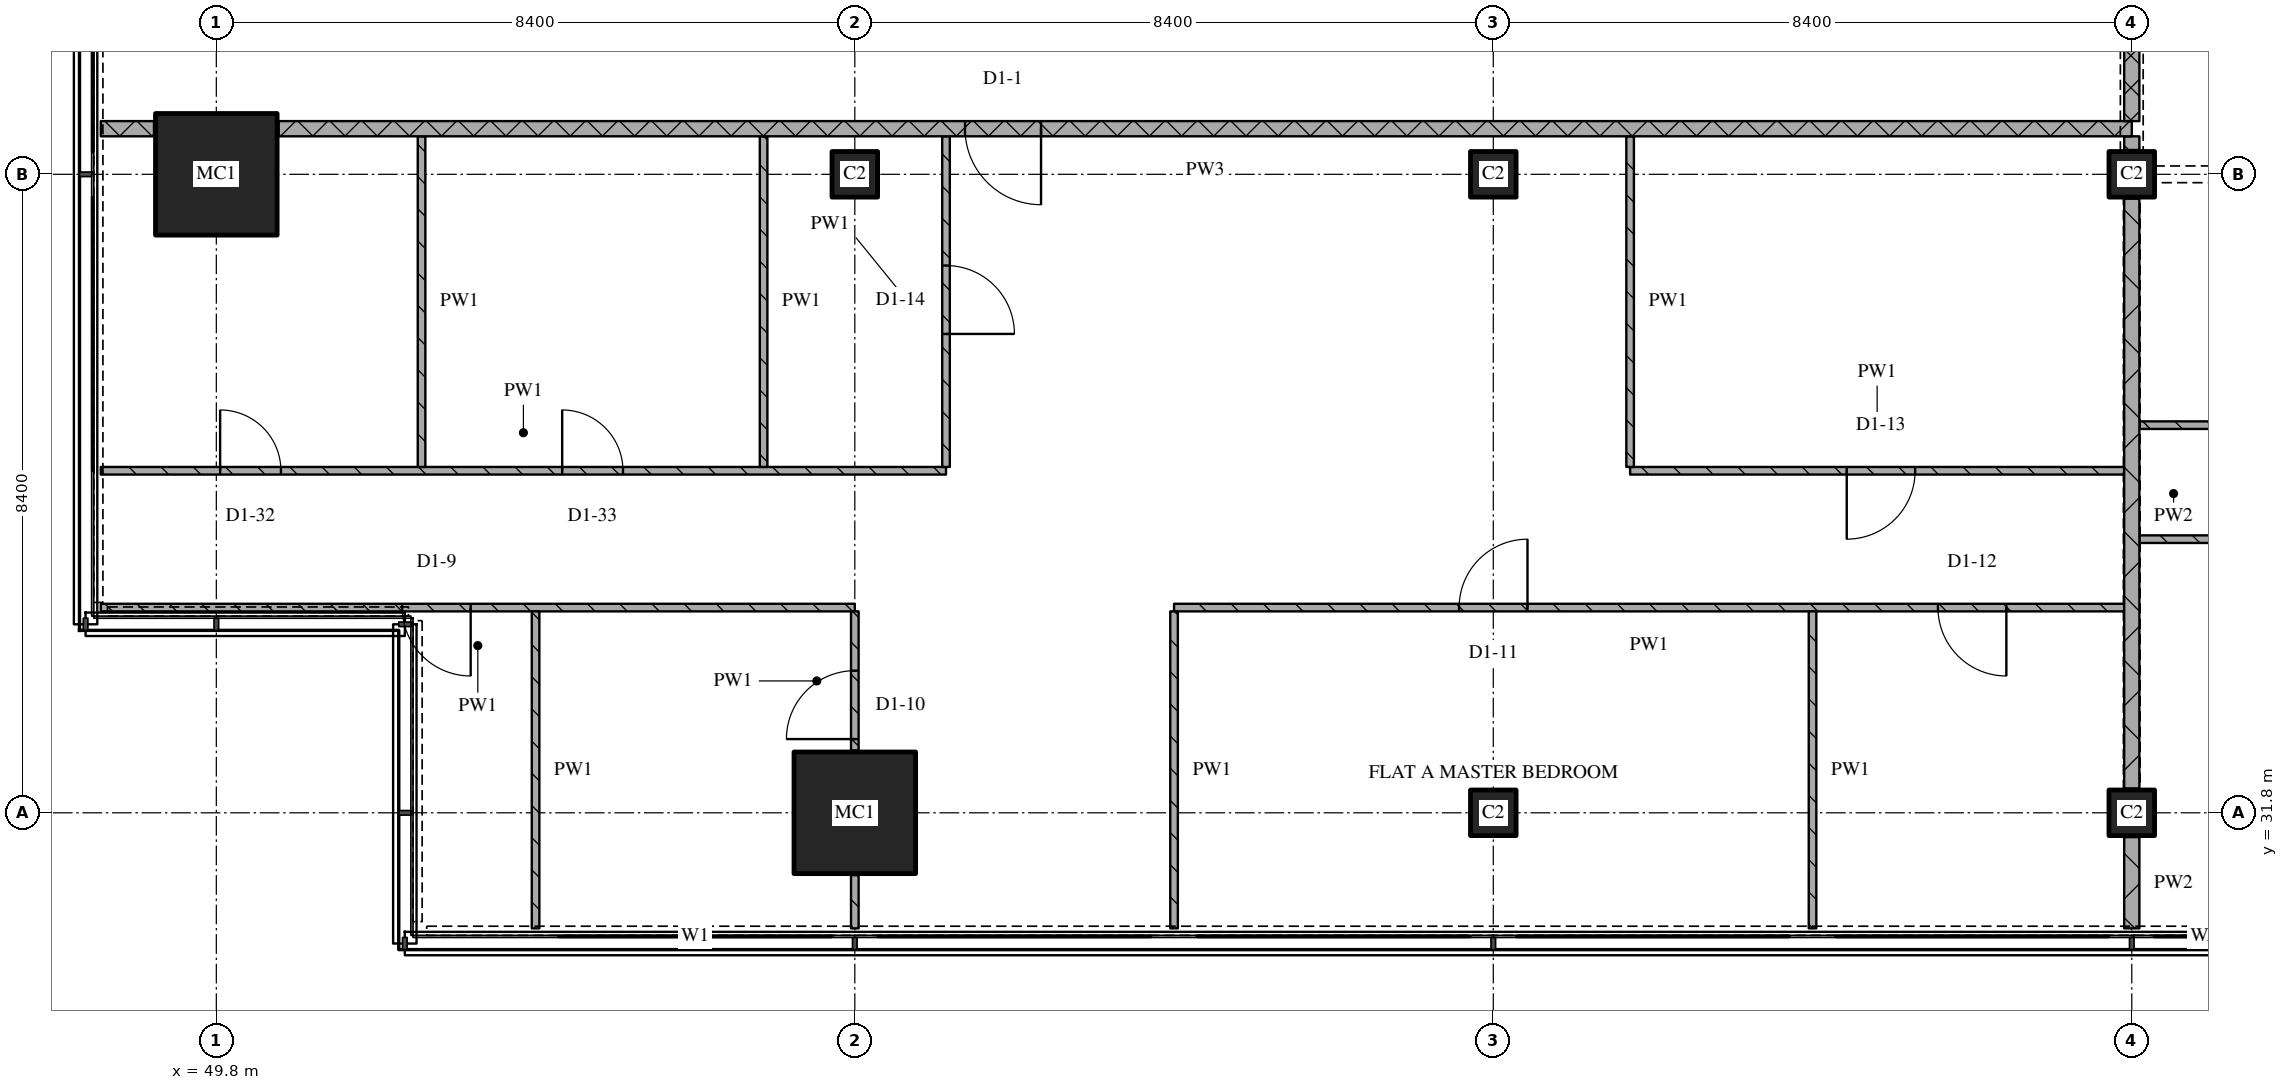
"""IFC4 building model, lengths in metres.
Left out: names, types, materials, properties, quantities, classifications, styles, units other than length and angle.
Written with IfcOpenShell. Run it as: python <this file> out.ifc"""

import sys

from ifc_helpers import new_model, si_unit, direction, frame, frame_2d, origin, origin_2d, place, context, subcontext, project, spatial, rectangle, extrude, element, fill, save


model = new_model("IFC4")
c1 = context("Model", 3, precision=1e-05, world=origin(), true_north=direction((0.0, 1.0)))
c2 = subcontext(c1, "Body", "Model", "MODEL_VIEW")
j1 = project(units=[si_unit("LENGTHUNIT", "METRE"), si_unit("PLANEANGLEUNIT", "RADIAN")], contexts=[c1])
p1 = place(None, origin())
s1 = spatial("IfcSite", under=j1, at=p1, CompositionType="ELEMENT")
p2 = place(p1, origin())
s2 = spatial("IfcBuilding", under=s1, at=p2, CompositionType="ELEMENT")
p3 = place(p2, frame((0.0, 0.0, 205.5)))
s3 = spatial("IfcBuildingStorey", under=s2, at=p3, CompositionType="ELEMENT", Elevation=205.5)
for number, where, z_axis, x_axis in (
    (1, (49.8, 40.2, 0.0), (0.0, 0.0, 1.0), (1.0, 0.0, 0.0)),
    (2, (58.2, 31.8, 0.0), (0.0, 0.0, 1.0), (1.0, 0.0, 0.0)),
):
    element("IfcColumn", number, at=place(p3, frame(where, z_axis=z_axis, x_axis=x_axis)), inside=s3, PredefinedType="COLUMN", context=c2, shape_type="SweptSolid", body=[
        extrude(rectangle(XDim=1.6, YDim=1.6, at=origin_2d()), origin(), (0.0, 0.0, 1.0), 3.6),
    ])
for number, where, z_axis, x_axis in (
    (3, (58.2, 40.2, 0.0), (0.0, 0.0, 1.0), (1.0, 0.0, 0.0)),
    (4, (66.6, 31.8, 0.0), (0.0, 0.0, 1.0), (1.0, 0.0, 0.0)),
    (5, (66.6, 40.2, 0.0), (0.0, 0.0, 1.0), (1.0, 0.0, 0.0)),
    (6, (75.0, 31.8, 0.0), (0.0, 0.0, 1.0), (1.0, 0.0, 0.0)),
    (7, (75.0, 40.2, 0.0), (0.0, 0.0, 1.0), (1.0, 0.0, 0.0)),
):
    element("IfcColumn", number, at=place(p3, frame(where, z_axis=z_axis, x_axis=x_axis)), inside=s3, PredefinedType="COLUMN", context=c2, shape_type="SweptSolid", body=[
        extrude(rectangle(XDim=0.6, YDim=0.6, at=origin_2d()), origin(), (0.0, 0.0, 1.0), 3.6),
    ])
p4 = place(p3, frame((58.2, 34.5, 0.0), z_axis=(0.0, 0.0, 1.0), x_axis=(-1.0, 0.0, 0.0)))
e8 = element("IfcWall", 8, at=p4, inside=s3, PredefinedType="PARTITIONING", context=c2, shape_type="SweptSolid", body=[
    extrude(rectangle(XDim=9.92, YDim=0.1, at=frame_2d((4.96, 0.0))), origin(), (0.0, 0.0, 1.0), 3.32),
])
p5 = place(p4, frame((5.054, 0.0, 0.0)))
e9 = element("IfcOpeningElement", 9, at=p5, cuts=e8, PredefinedType="OPENING", context=c2, shape_type="SweptSolid", body=[
    extrude(rectangle(XDim=0.9, YDim=2.1, at=frame_2d((0.45, 1.05))), frame((0.0, 0.06, 0.0), z_axis=(0.0, -1.0, 0.0), x_axis=(1.0, 0.0, 0.0)), (0.0, 0.0, 1.0), 0.12),
])
p6 = place(p3, frame((74.9, 34.5, 0.0), z_axis=(0.0, 0.0, 1.0), x_axis=(-1.0, 0.0, 0.0)))
e10 = element("IfcWall", 10, at=p6, inside=s3, PredefinedType="PARTITIONING", context=c2, shape_type="SweptSolid", body=[
    extrude(rectangle(XDim=12.5, YDim=0.1, at=frame_2d((6.25, 0.0))), origin(), (0.0, 0.0, 1.0), 3.32),
])
p7 = place(p6, frame((1.55, 0.0, 0.0)))
e11 = element("IfcOpeningElement", 11, at=p7, cuts=e10, PredefinedType="OPENING", context=c2, shape_type="SweptSolid", body=[
    extrude(rectangle(XDim=0.9, YDim=2.1, at=frame_2d((0.45, 1.05))), frame((0.0, 0.06, 0.0), z_axis=(0.0, -1.0, 0.0), x_axis=(1.0, 0.0, 0.0)), (0.0, 0.0, 1.0), 0.12),
])
p8 = place(p6, frame((7.85, 0.0, 0.0)))
e12 = element("IfcOpeningElement", 12, at=p8, cuts=e10, PredefinedType="OPENING", context=c2, shape_type="SweptSolid", body=[
    extrude(rectangle(XDim=0.9, YDim=2.1, at=frame_2d((0.45, 1.05))), frame((0.0, 0.06, 0.0), z_axis=(0.0, -1.0, 0.0), x_axis=(1.0, 0.0, 0.0)), (0.0, 0.0, 1.0), 0.12),
])
p9 = place(p3, frame((75.1, 35.4, 0.0), z_axis=(0.0, 0.0, 1.0), x_axis=(1.0, 0.0, 0.0)))
e13 = element("IfcWall", 13, at=p9, inside=s3, PredefinedType="PARTITIONING", context=c2, shape_type="SweptSolid", body=[
    extrude(rectangle(XDim=8.3, YDim=0.1, at=frame_2d((4.15, 0.0))), origin(), (0.0, 0.0, 1.0), 3.32),
])
p10 = place(p3, frame((48.28, 36.3, 0.0), z_axis=(0.0, 0.0, 1.0), x_axis=(1.0, 0.0, 0.0)))
e14 = element("IfcWall", 14, at=p10, inside=s3, PredefinedType="PARTITIONING", context=c2, shape_type="SweptSolid", body=[
    extrude(rectangle(XDim=11.12, YDim=0.1, at=frame_2d((5.56, 0.0))), origin(), (0.0, 0.0, 1.0), 3.32),
])
p11 = place(p10, frame((1.57, 0.0, 0.0)))
e15 = element("IfcOpeningElement", 15, at=p11, cuts=e14, PredefinedType="OPENING", context=c2, shape_type="SweptSolid", body=[
    extrude(rectangle(XDim=0.8, YDim=2.1, at=frame_2d((0.4, 1.05))), frame((0.0, 0.06, 0.0), z_axis=(0.0, -1.0, 0.0), x_axis=(1.0, 0.0, 0.0)), (0.0, 0.0, 1.0), 0.12),
])
p12 = place(p10, frame((6.07, 0.0, 0.0)))
e16 = element("IfcOpeningElement", 16, at=p12, cuts=e14, PredefinedType="OPENING", context=c2, shape_type="SweptSolid", body=[
    extrude(rectangle(XDim=0.8, YDim=2.1, at=frame_2d((0.4, 1.05))), frame((0.0, 0.06, 0.0), z_axis=(0.0, -1.0, 0.0), x_axis=(1.0, 0.0, 0.0)), (0.0, 0.0, 1.0), 0.12),
])
p13 = place(p3, frame((68.4, 36.3, 0.0), z_axis=(0.0, 0.0, 1.0), x_axis=(1.0, 0.0, 0.0)))
e17 = element("IfcWall", 17, at=p13, inside=s3, PredefinedType="PARTITIONING", context=c2, shape_type="SweptSolid", body=[
    extrude(rectangle(XDim=6.5, YDim=0.1, at=frame_2d((3.25, 0.0))), origin(), (0.0, 0.0, 1.0), 3.32),
])
p14 = place(p13, frame((2.85, 0.0, 0.0)))
e18 = element("IfcOpeningElement", 18, at=p14, cuts=e17, PredefinedType="OPENING", context=c2, shape_type="SweptSolid", body=[
    extrude(rectangle(XDim=0.9, YDim=2.1, at=frame_2d((0.45, 1.05))), frame((0.0, 0.06, 0.0), z_axis=(0.0, -1.0, 0.0), x_axis=(1.0, 0.0, 0.0)), (0.0, 0.0, 1.0), 0.12),
])
p15 = place(p3, frame((75.1, 36.9, 0.0), z_axis=(0.0, 0.0, 1.0), x_axis=(1.0, 0.0, 0.0)))
e19 = element("IfcWall", 19, at=p15, inside=s3, PredefinedType="PARTITIONING", context=c2, shape_type="SweptSolid", body=[
    extrude(rectangle(XDim=6.5, YDim=0.1, at=frame_2d((3.25, 0.0))), origin(), (0.0, 0.0, 1.0), 3.32),
])
p16 = place(p15, frame((1.603, 0.0, 0.0)))
e20 = element("IfcOpeningElement", 20, at=p16, cuts=e19, PredefinedType="OPENING", context=c2, shape_type="SweptSolid", body=[
    extrude(rectangle(XDim=0.8, YDim=2.1, at=frame_2d((0.4, 1.05))), frame((0.0, 0.06, 0.0), z_axis=(0.0, -1.0, 0.0), x_axis=(1.0, 0.0, 0.0)), (0.0, 0.0, 1.0), 0.12),
])
p17 = place(p3, frame((48.28, 40.8, 0.0), z_axis=(0.0, 0.0, 1.0), x_axis=(1.0, 0.0, 0.0)))
e21 = element("IfcWall", 21, at=p17, inside=s3, PredefinedType="PARTITIONING", context=c2, shape_type="SweptSolid", body=[
    extrude(rectangle(XDim=0.7, YDim=0.2, at=frame_2d((0.35, 0.0))), origin(), (0.0, 0.0, 1.0), 3.32),
])
p18 = place(p3, frame((75.0, 40.8, 0.0), z_axis=(0.0, 0.0, 1.0), x_axis=(-1.0, 0.0, 0.0)))
e22 = element("IfcWall", 22, at=p18, inside=s3, PredefinedType="PARTITIONING", context=c2, shape_type="SweptSolid", body=[
    extrude(rectangle(XDim=24.38, YDim=0.2, at=frame_2d((12.19, 0.0))), origin(), (0.0, 0.0, 1.0), 3.32),
])
p19 = place(p18, frame((14.35, 0.0, 0.0)))
e23 = element("IfcOpeningElement", 23, at=p19, cuts=e22, PredefinedType="OPENING", context=c2, shape_type="SweptSolid", body=[
    extrude(rectangle(XDim=1.0, YDim=2.1, at=frame_2d((0.5, 1.05))), frame((0.0, 0.11, 0.0), z_axis=(0.0, -1.0, 0.0), x_axis=(1.0, 0.0, 0.0)), (0.0, 0.0, 1.0), 0.22),
])
p20 = place(p3, frame((52.5, 40.7, 0.0), z_axis=(0.0, 0.0, 1.0), x_axis=(0.0, -1.0, 0.0)))
e24 = element("IfcWall", 24, at=p20, inside=s3, PredefinedType="PARTITIONING", context=c2, shape_type="SweptSolid", body=[
    extrude(rectangle(XDim=4.35, YDim=0.1, at=frame_2d((2.175, 0.0))), origin(), (0.0, 0.0, 1.0), 3.32),
])
p21 = place(p3, frame((54.0, 34.45, 0.0), z_axis=(0.0, 0.0, 1.0), x_axis=(0.0, -1.0, 0.0)))
e25 = element("IfcWall", 25, at=p21, inside=s3, PredefinedType="PARTITIONING", context=c2, shape_type="SweptSolid", body=[
    extrude(rectangle(XDim=4.17, YDim=0.1, at=frame_2d((2.085, 0.0))), origin(), (0.0, 0.0, 1.0), 3.32),
])
p22 = place(p3, frame((57.0, 40.7, 0.0), z_axis=(0.0, 0.0, 1.0), x_axis=(0.0, -1.0, 0.0)))
e26 = element("IfcWall", 26, at=p22, inside=s3, PredefinedType="PARTITIONING", context=c2, shape_type="SweptSolid", body=[
    extrude(rectangle(XDim=4.35, YDim=0.1, at=frame_2d((2.175, 0.0))), origin(), (0.0, 0.0, 1.0), 3.32),
])
p23 = place(p3, frame((58.2, 30.98, 0.0), z_axis=(0.0, 0.0, 1.0), x_axis=(0.0, -1.0, 0.0)))
e27 = element("IfcWall", 27, at=p23, inside=s3, PredefinedType="PARTITIONING", context=c2, shape_type="SweptSolid", body=[
    extrude(rectangle(XDim=0.7, YDim=0.1, at=frame_2d((0.35, 0.0))), origin(), (0.0, 0.0, 1.0), 3.32),
])
p24 = place(p3, frame((58.2, 32.62, 0.0), z_axis=(0.0, 0.0, 1.0), x_axis=(0.0, 1.0, 0.0)))
e28 = element("IfcWall", 28, at=p24, inside=s3, PredefinedType="PARTITIONING", context=c2, shape_type="SweptSolid", body=[
    extrude(rectangle(XDim=1.83, YDim=0.1, at=frame_2d((0.915, 0.0))), origin(), (0.0, 0.0, 1.0), 3.32),
])
p25 = place(p24, frame((0.15, 0.0, 0.0)))
e29 = element("IfcOpeningElement", 29, at=p25, cuts=e28, PredefinedType="OPENING", context=c2, shape_type="SweptSolid", body=[
    extrude(rectangle(XDim=0.9, YDim=2.1, at=frame_2d((0.45, 1.05))), frame((0.0, 0.06, 0.0), z_axis=(0.0, -1.0, 0.0), x_axis=(1.0, 0.0, 0.0)), (0.0, 0.0, 1.0), 0.12),
])
p26 = place(p3, frame((59.4, 36.35, 0.0), z_axis=(0.0, 0.0, 1.0), x_axis=(0.0, 1.0, 0.0)))
e30 = element("IfcWall", 30, at=p26, inside=s3, PredefinedType="PARTITIONING", context=c2, shape_type="SweptSolid", body=[
    extrude(rectangle(XDim=4.35, YDim=0.1, at=frame_2d((2.175, 0.0))), origin(), (0.0, 0.0, 1.0), 3.32),
])
p27 = place(p26, frame((1.75, 0.0, 0.0)))
e31 = element("IfcOpeningElement", 31, at=p27, cuts=e30, PredefinedType="OPENING", context=c2, shape_type="SweptSolid", body=[
    extrude(rectangle(XDim=0.9, YDim=2.1, at=frame_2d((0.45, 1.05))), frame((0.0, 0.06, 0.0), z_axis=(0.0, -1.0, 0.0), x_axis=(1.0, 0.0, 0.0)), (0.0, 0.0, 1.0), 0.12),
])
p28 = place(p3, frame((62.4, 34.45, 0.0), z_axis=(0.0, 0.0, 1.0), x_axis=(0.0, -1.0, 0.0)))
e32 = element("IfcWall", 32, at=p28, inside=s3, PredefinedType="PARTITIONING", context=c2, shape_type="SweptSolid", body=[
    extrude(rectangle(XDim=4.17, YDim=0.1, at=frame_2d((2.085, 0.0))), origin(), (0.0, 0.0, 1.0), 3.32),
])
p29 = place(p3, frame((68.4, 40.7, 0.0), z_axis=(0.0, 0.0, 1.0), x_axis=(0.0, -1.0, 0.0)))
e33 = element("IfcWall", 33, at=p29, inside=s3, PredefinedType="PARTITIONING", context=c2, shape_type="SweptSolid", body=[
    extrude(rectangle(XDim=4.35, YDim=0.1, at=frame_2d((2.175, 0.0))), origin(), (0.0, 0.0, 1.0), 3.32),
])
p30 = place(p3, frame((70.8, 34.45, 0.0), z_axis=(0.0, 0.0, 1.0), x_axis=(0.0, -1.0, 0.0)))
e34 = element("IfcWall", 34, at=p30, inside=s3, PredefinedType="PARTITIONING", context=c2, shape_type="SweptSolid", body=[
    extrude(rectangle(XDim=4.17, YDim=0.1, at=frame_2d((2.085, 0.0))), origin(), (0.0, 0.0, 1.0), 3.32),
])
p31 = place(p3, frame((75.0, 43.1, 0.0), z_axis=(0.0, 0.0, 1.0), x_axis=(0.0, -1.0, 0.0)))
e35 = element("IfcWall", 35, at=p31, inside=s3, PredefinedType="PARTITIONING", context=c2, shape_type="SweptSolid", body=[
    extrude(rectangle(XDim=2.2, YDim=0.2, at=frame_2d((1.1, 0.0))), origin(), (0.0, 0.0, 1.0), 2.53),
])
p32 = place(p3, frame((75.0, 31.48, 0.0), z_axis=(0.0, 0.0, 1.0), x_axis=(0.0, -1.0, 0.0)))
e36 = element("IfcWall", 36, at=p32, inside=s3, PredefinedType="PARTITIONING", context=c2, shape_type="SweptSolid", body=[
    extrude(rectangle(XDim=1.2, YDim=0.2, at=frame_2d((0.6, 0.0))), origin(), (0.0, 0.0, 1.0), 3.32),
])
p33 = place(p3, frame((75.0, 39.88, 0.0), z_axis=(0.0, 0.0, 1.0), x_axis=(0.0, -1.0, 0.0)))
e37 = element("IfcWall", 37, at=p33, inside=s3, PredefinedType="PARTITIONING", context=c2, shape_type="SweptSolid", body=[
    extrude(rectangle(XDim=7.76, YDim=0.2, at=frame_2d((3.88, 0.0))), origin(), (0.0, 0.0, 1.0), 2.72),
])
p34 = place(p3, frame((75.0, 40.7, 0.0), z_axis=(0.0, 0.0, 1.0), x_axis=(0.0, -1.0, 0.0)))
e38 = element("IfcWall", 38, at=p34, inside=s3, PredefinedType="PARTITIONING", context=c2, shape_type="SweptSolid", body=[
    extrude(rectangle(XDim=0.18, YDim=0.2, at=frame_2d((0.09, 0.0))), origin(), (0.0, 0.0, 1.0), 3.32),
])
p35 = place(p5, origin())
e39 = element("IfcDoor", 39, at=p35, inside=s3, OperationType="SINGLE_SWING_LEFT", PredefinedType="DOOR", context=c2, shape_type="SweptSolid", body=[
    extrude(rectangle(XDim=0.9, YDim=2.1, at=frame_2d((0.45, 1.05))), frame((0.0, 0.025, 0.0), z_axis=(0.0, -1.0, 0.0), x_axis=(1.0, 0.0, 0.0)), (0.0, 0.0, 1.0), 0.05),
])
fill(e9, e39)
p36 = place(p7, origin())
e40 = element("IfcDoor", 40, at=p36, inside=s3, OperationType="SINGLE_SWING_LEFT", PredefinedType="DOOR", context=c2, shape_type="SweptSolid", body=[
    extrude(rectangle(XDim=0.9, YDim=2.1, at=frame_2d((0.45, 1.05))), frame((0.0, 0.025, 0.0), z_axis=(0.0, -1.0, 0.0), x_axis=(1.0, 0.0, 0.0)), (0.0, 0.0, 1.0), 0.05),
])
fill(e11, e40)
p37 = place(p8, origin())
e41 = element("IfcDoor", 41, at=p37, inside=s3, OperationType="SINGLE_SWING_RIGHT", PredefinedType="DOOR", context=c2, shape_type="SweptSolid", body=[
    extrude(rectangle(XDim=0.9, YDim=2.1, at=frame_2d((0.45, 1.05))), frame((0.0, 0.025, 0.0), z_axis=(0.0, -1.0, 0.0), x_axis=(1.0, 0.0, 0.0)), (0.0, 0.0, 1.0), 0.05),
])
fill(e12, e41)
p38 = place(p11, origin())
e42 = element("IfcDoor", 42, at=p38, inside=s3, OperationType="SINGLE_SWING_LEFT", PredefinedType="DOOR", context=c2, shape_type="SweptSolid", body=[
    extrude(rectangle(XDim=0.8, YDim=2.1, at=frame_2d((0.4, 1.05))), frame((0.0, 0.025, 0.0), z_axis=(0.0, -1.0, 0.0), x_axis=(1.0, 0.0, 0.0)), (0.0, 0.0, 1.0), 0.05),
])
fill(e15, e42)
p39 = place(p12, origin())
e43 = element("IfcDoor", 43, at=p39, inside=s3, OperationType="SINGLE_SWING_LEFT", PredefinedType="DOOR", context=c2, shape_type="SweptSolid", body=[
    extrude(rectangle(XDim=0.8, YDim=2.1, at=frame_2d((0.4, 1.05))), frame((0.0, 0.025, 0.0), z_axis=(0.0, -1.0, 0.0), x_axis=(1.0, 0.0, 0.0)), (0.0, 0.0, 1.0), 0.05),
])
fill(e16, e43)
p40 = place(p14, origin())
e44 = element("IfcDoor", 44, at=p40, inside=s3, OperationType="SINGLE_SWING_RIGHT", PredefinedType="DOOR", context=c2, shape_type="SweptSolid", body=[
    extrude(rectangle(XDim=0.9, YDim=2.1, at=frame_2d((0.45, 1.05))), frame((0.0, 0.025, 0.0), z_axis=(0.0, -1.0, 0.0), x_axis=(1.0, 0.0, 0.0)), (0.0, 0.0, 1.0), 0.05),
])
fill(e18, e44)
p41 = place(p19, origin())
e45 = element("IfcDoor", 45, at=p41, inside=s3, OperationType="SINGLE_SWING_LEFT", PredefinedType="DOOR", context=c2, shape_type="SweptSolid", body=[
    extrude(rectangle(XDim=1.0, YDim=2.1, at=frame_2d((0.5, 1.05))), frame((0.0, 0.025, 0.0), z_axis=(0.0, -1.0, 0.0), x_axis=(1.0, 0.0, 0.0)), (0.0, 0.0, 1.0), 0.05),
])
fill(e23, e45)
p42 = place(p25, origin())
e46 = element("IfcDoor", 46, at=p42, inside=s3, OperationType="SINGLE_SWING_LEFT", PredefinedType="DOOR", context=c2, shape_type="SweptSolid", body=[
    extrude(rectangle(XDim=0.9, YDim=2.1, at=frame_2d((0.45, 1.05))), frame((0.0, 0.025, 0.0), z_axis=(0.0, -1.0, 0.0), x_axis=(1.0, 0.0, 0.0)), (0.0, 0.0, 1.0), 0.05),
])
fill(e29, e46)
p43 = place(p27, origin())
e47 = element("IfcDoor", 47, at=p43, inside=s3, OperationType="SINGLE_SWING_RIGHT", PredefinedType="DOOR", context=c2, shape_type="SweptSolid", body=[
    extrude(rectangle(XDim=0.9, YDim=2.1, at=frame_2d((0.45, 1.05))), frame((0.0, 0.025, 0.0), z_axis=(0.0, -1.0, 0.0), x_axis=(1.0, 0.0, 0.0)), (0.0, 0.0, 1.0), 0.05),
])
fill(e31, e47)
save(model, sys.argv[1])
